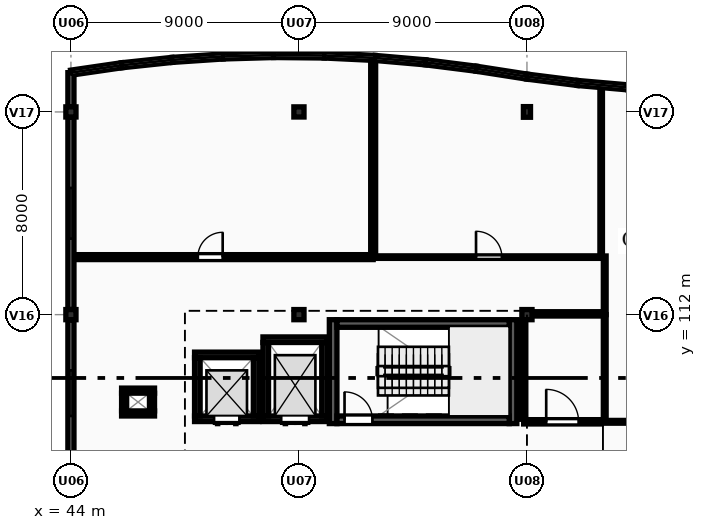
"""IFC4 building model, lengths in metres.
Left out: names, types, materials, properties, quantities, classifications, styles, units other than length and angle.
Written with IfcOpenShell. Run it as: python <this file> out.ifc"""

import sys

from ifc_helpers import new_model, si_unit, direction, frame, frame_2d, origin, origin_2d, place, context, subcontext, project, spatial, rectangle, extrude, element, fill, save


model = new_model("IFC4")
c1 = context("Model", 3, precision=1e-05, world=origin(), true_north=direction((0.0, 1.0)))
c2 = subcontext(c1, "Body", "Model", "MODEL_VIEW")
j1 = project(units=[si_unit("LENGTHUNIT", "METRE"), si_unit("PLANEANGLEUNIT", "RADIAN")], contexts=[c1])
p1 = place(None, origin())
s1 = spatial("IfcSite", under=j1, at=p1, CompositionType="ELEMENT")
p2 = place(p1, origin())
s2 = spatial("IfcBuilding", under=s1, at=p2, CompositionType="ELEMENT")
p3 = place(p2, frame((0.0, 0.0, 8.4)))
s3 = spatial("IfcBuildingStorey", under=s2, at=p3, CompositionType="ELEMENT", Elevation=8.4)
for number, where, z_axis, x_axis in (
    (1, (44.0, 112.0, 0.0), (0.0, 0.0, 1.0), (1.0, 0.0, 0.0)),
    (2, (44.0, 120.0, 0.0), (0.0, 0.0, 1.0), (1.0, 0.0, 0.0)),
    (3, (53.0, 112.0, 0.0), (0.0, 0.0, 1.0), (1.0, 0.0, 0.0)),
    (4, (53.0, 120.0, 0.0), (0.0, 0.0, 1.0), (1.0, 0.0, 0.0)),
    (5, (62.0, 112.0, 0.0), (0.0, 0.0, 1.0), (1.0, 0.0, 0.0)),
):
    element("IfcColumn", number, at=place(p3, frame(where, z_axis=z_axis, x_axis=x_axis)), inside=s3, PredefinedType="COLUMN", context=c2, shape_type="SweptSolid", body=[
        extrude(rectangle(XDim=0.4, YDim=0.4, at=origin_2d()), origin(), (0.0, 0.0, 1.0), 3.9),
    ])
p4 = place(p3, frame((62.0, 120.0, 0.0), z_axis=(0.0, 0.0, 1.0), x_axis=(1.0, 0.0, 0.0)))
e6 = element("IfcColumn", 6, at=p4, inside=s3, PredefinedType="PILASTER", context=c2, shape_type="SweptSolid", body=[
    extrude(rectangle(XDim=0.28, YDim=0.42, at=origin_2d()), origin(), (0.0, 0.0, 1.0), 3.9),
])
p5 = place(p3, frame((44.0, 121.55, 0.0), z_axis=(0.0, 0.0, 1.0), x_axis=(0.989544477223, 0.144228040259, 0.0)))
e7 = element("IfcWall", 7, at=p5, inside=s3, PredefinedType="SOLIDWALL", context=c2, shape_type="SweptSolid", body=[
    extrude(rectangle(XDim=2.021, YDim=0.2, at=frame_2d((1.011, 0.0))), origin(), (0.0, 0.0, 1.0), 0.95),
])
p6 = place(p3, frame((46.0, 121.842, 0.0), z_axis=(0.0, 0.0, 1.0), x_axis=(0.994395160059, 0.105727317433, 0.0)))
e8 = element("IfcWall", 8, at=p6, inside=s3, PredefinedType="SOLIDWALL", context=c2, shape_type="SweptSolid", body=[
    extrude(rectangle(XDim=2.011, YDim=0.2, at=frame_2d((1.006, 0.0))), origin(), (0.0, 0.0, 1.0), 0.95),
])
p7 = place(p3, frame((48.0, 122.054, 0.0), z_axis=(0.0, 0.0, 1.0), x_axis=(0.997729302978, 0.067351599676, 0.0)))
e9 = element("IfcWall", 9, at=p7, inside=s3, PredefinedType="SOLIDWALL", context=c2, shape_type="SweptSolid", body=[
    extrude(rectangle(XDim=2.005, YDim=0.2, at=frame_2d((1.002, 0.0))), origin(), (0.0, 0.0, 1.0), 0.95),
])
p8 = place(p3, frame((50.0, 122.189, 0.0), z_axis=(0.0, 0.0, 1.0), x_axis=(0.999581770858, 0.028918564416, 0.0)))
e10 = element("IfcWall", 10, at=p8, inside=s3, PredefinedType="SOLIDWALL", context=c2, shape_type="SweptSolid", body=[
    extrude(rectangle(XDim=2.001, YDim=0.2, at=frame_2d((1.0, 0.0))), origin(), (0.0, 0.0, 1.0), 0.95),
])
p9 = place(p3, frame((52.0, 122.247, 0.0), z_axis=(0.0, 0.0, 1.0), x_axis=(0.999953504169, -0.009643106302, 0.0)))
e11 = element("IfcWall", 11, at=p9, inside=s3, PredefinedType="SOLIDWALL", context=c2, shape_type="SweptSolid", body=[
    extrude(rectangle(XDim=2.0, YDim=0.2, at=frame_2d((1.0, 0.0))), origin(), (0.0, 0.0, 1.0), 0.95),
])
p10 = place(p3, frame((54.0, 122.228, 0.0), z_axis=(0.0, 0.0, 1.0), x_axis=(0.99884540439, -0.048040172037, 0.0)))
e12 = element("IfcWall", 12, at=p10, inside=s3, PredefinedType="SOLIDWALL", context=c2, shape_type="SweptSolid", body=[
    extrude(rectangle(XDim=2.002, YDim=0.2, at=frame_2d((1.001, 0.0))), origin(), (0.0, 0.0, 1.0), 0.95),
])
p11 = place(p3, frame((56.0, 122.132, 0.0), z_axis=(0.0, 0.0, 1.0), x_axis=(0.996244237948, -0.086587633962, 0.0)))
e13 = element("IfcWall", 13, at=p11, inside=s3, PredefinedType="SOLIDWALL", context=c2, shape_type="SweptSolid", body=[
    extrude(rectangle(XDim=2.008, YDim=0.2, at=frame_2d((1.004, 0.0))), origin(), (0.0, 0.0, 1.0), 0.95),
])
p12 = place(p3, frame((58.0, 121.958, 0.0), z_axis=(0.0, 0.0, 1.0), x_axis=(0.992158168336, -0.124988675503, 0.0)))
e14 = element("IfcWall", 14, at=p12, inside=s3, PredefinedType="SOLIDWALL", context=c2, shape_type="SweptSolid", body=[
    extrude(rectangle(XDim=2.016, YDim=0.2, at=frame_2d((1.008, 0.0))), origin(), (0.0, 0.0, 1.0), 0.95),
])
p13 = place(p3, frame((60.0, 121.706, 0.0), z_axis=(0.0, 0.0, 1.0), x_axis=(0.988085509852, -0.153905897287, 0.0)))
e15 = element("IfcWall", 15, at=p13, inside=s3, PredefinedType="SOLIDWALL", context=c2, shape_type="SweptSolid", body=[
    extrude(rectangle(XDim=2.024, YDim=0.2, at=frame_2d((1.012, 0.0))), origin(), (0.0, 0.0, 1.0), 0.95),
])
p14 = place(p3, frame((62.0, 121.394, 0.0), z_axis=(0.0, 0.0, 1.0), x_axis=(0.992158168336, -0.124988675503, 0.0)))
e16 = element("IfcWall", 16, at=p14, inside=s3, PredefinedType="SOLIDWALL", context=c2, shape_type="SweptSolid", body=[
    extrude(rectangle(XDim=2.016, YDim=0.2, at=frame_2d((1.008, 0.0))), origin(), (0.0, 0.0, 1.0), 0.95),
])
p15 = place(p3, frame((64.0, 121.142, 0.0), z_axis=(0.0, 0.0, 1.0), x_axis=(0.996244237948, -0.086587633962, 0.0)))
e17 = element("IfcWall", 17, at=p15, inside=s3, PredefinedType="SOLIDWALL", context=c2, shape_type="SweptSolid", body=[
    extrude(rectangle(XDim=2.008, YDim=0.2, at=frame_2d((1.004, 0.0))), origin(), (0.0, 0.0, 1.0), 0.95),
])
p16 = place(p3, frame((44.0, 104.2, 0.0), z_axis=(0.0, 0.0, 1.0), x_axis=(0.0, 1.0, 0.0)))
e18 = element("IfcWall", 18, at=p16, inside=s3, PredefinedType="SOLIDWALL", context=c2, shape_type="SweptSolid", body=[
    extrude(rectangle(XDim=7.6, YDim=0.24, at=frame_2d((3.8, 0.0))), origin(), (0.0, 0.0, 1.0), 3.29),
])
p17 = place(p16, frame((3.8, 0.0, 0.95)))
e19 = element("IfcOpeningElement", 19, at=p17, cuts=e18, PredefinedType="OPENING", context=c2, shape_type="SweptSolid", body=[
    extrude(rectangle(XDim=1.8, YDim=1.5, at=frame_2d((0.9, 0.75))), frame((0.0, 0.13, 0.0), z_axis=(0.0, -1.0, 0.0), x_axis=(1.0, 0.0, 0.0)), (0.0, 0.0, 1.0), 0.26),
])
p18 = place(p3, frame((44.0, 112.2, 0.0), z_axis=(0.0, 0.0, 1.0), x_axis=(0.0, 1.0, 0.0)))
e20 = element("IfcWall", 20, at=p18, inside=s3, PredefinedType="SOLIDWALL", context=c2, shape_type="SweptSolid", body=[
    extrude(rectangle(XDim=7.6, YDim=0.24, at=frame_2d((3.8, 0.0))), origin(), (0.0, 0.0, 1.0), 3.29),
])
p19 = place(p18, frame((2.8, 0.0, 0.95)))
e21 = element("IfcOpeningElement", 21, at=p19, cuts=e20, PredefinedType="OPENING", context=c2, shape_type="SweptSolid", body=[
    extrude(rectangle(XDim=2.0, YDim=1.5, at=frame_2d((1.0, 0.75))), frame((0.0, 0.13, 0.0), z_axis=(0.0, -1.0, 0.0), x_axis=(1.0, 0.0, 0.0)), (0.0, 0.0, 1.0), 0.26),
])
p20 = place(p3, frame((44.0, 120.2, 0.0), z_axis=(0.0, 0.0, 1.0), x_axis=(0.0, 1.0, 0.0)))
e22 = element("IfcWall", 22, at=p20, inside=s3, PredefinedType="SOLIDWALL", context=c2, shape_type="SweptSolid", body=[
    extrude(rectangle(XDim=1.35, YDim=0.24, at=frame_2d((0.675, 0.0))), origin(), (0.0, 0.0, 1.0), 3.29),
])
for number, where, z_axis, x_axis in (
    (23, (54.35, 107.7, 0.0), (0.0, 0.0, 1.0), (0.0, 1.0, 0.0)),
    (24, (61.45, 111.8, 0.0), (0.0, 0.0, 1.0), (0.0, -1.0, 0.0)),
):
    element("IfcWall", number, at=place(p3, frame(where, z_axis=z_axis, x_axis=x_axis)), inside=s3, PredefinedType="SHEAR", context=c2, shape_type="SweptSolid", body=[
        extrude(rectangle(XDim=4.1, YDim=0.3, at=frame_2d((2.05, 0.0))), origin(), (0.0, 0.0, 1.0), 3.65),
    ])
p21 = place(p3, frame((54.5, 107.85, 0.0), z_axis=(0.0, 0.0, 1.0), x_axis=(1.0, 0.0, 0.0)))
e25 = element("IfcWall", 25, at=p21, inside=s3, PredefinedType="SHEAR", context=c2, shape_type="SweptSolid", body=[
    extrude(rectangle(XDim=6.8, YDim=0.3, at=frame_2d((3.4, 0.0))), origin(), (0.0, 0.0, 1.0), 3.65),
])
p22 = place(p21, frame((0.3, 0.0, 0.0)))
e26 = element("IfcOpeningElement", 26, at=p22, cuts=e25, PredefinedType="OPENING", context=c2, shape_type="SweptSolid", body=[
    extrude(rectangle(XDim=1.1, YDim=2.15, at=frame_2d((0.55, 1.075))), frame((0.0, 0.16, 0.0), z_axis=(0.0, -1.0, 0.0), x_axis=(1.0, 0.0, 0.0)), (0.0, 0.0, 1.0), 0.32),
])
p23 = place(p3, frame((61.3, 111.65, 0.0), z_axis=(0.0, 0.0, 1.0), x_axis=(-1.0, 0.0, 0.0)))
e27 = element("IfcWall", 27, at=p23, inside=s3, PredefinedType="SHEAR", context=c2, shape_type="SweptSolid", body=[
    extrude(rectangle(XDim=6.8, YDim=0.3, at=frame_2d((3.4, 0.0))), origin(), (0.0, 0.0, 1.0), 3.65),
])
p24 = place(p3, frame((54.12, 107.89, 0.0), z_axis=(0.0, 0.0, 1.0), x_axis=(-1.0, 0.0, 0.0)))
e28 = element("IfcWall", 28, at=p24, inside=s3, PredefinedType="SHEAR", context=c2, shape_type="SweptSolid", body=[
    extrude(rectangle(XDim=2.54, YDim=0.22, at=frame_2d((1.27, 0.0))), origin(), (0.0, 0.0, 1.0), 3.65),
])
p25 = place(p24, frame((0.72, 0.0, 0.0)))
e29 = element("IfcOpeningElement", 29, at=p25, cuts=e28, PredefinedType="OPENING", context=c2, shape_type="SweptSolid", body=[
    extrude(rectangle(XDim=1.1, YDim=2.15, at=frame_2d((0.55, 1.075))), frame((0.0, 0.12, 0.0), z_axis=(0.0, -1.0, 0.0), x_axis=(1.0, 0.0, 0.0)), (0.0, 0.0, 1.0), 0.24),
])
p26 = place(p3, frame((51.58, 111.01, 0.0), z_axis=(0.0, 0.0, 1.0), x_axis=(1.0, 0.0, 0.0)))
e30 = element("IfcWall", 30, at=p26, inside=s3, PredefinedType="SHEAR", context=c2, shape_type="SweptSolid", body=[
    extrude(rectangle(XDim=2.54, YDim=0.22, at=frame_2d((1.27, 0.0))), origin(), (0.0, 0.0, 1.0), 3.65),
])
for number, where, z_axis, x_axis in (
    (31, (51.69, 108.0, 0.0), (0.0, 0.0, 1.0), (0.0, 1.0, 0.0)),
    (32, (54.01, 110.9, 0.0), (0.0, 0.0, 1.0), (0.0, -1.0, 0.0)),
):
    element("IfcWall", number, at=place(p3, frame(where, z_axis=z_axis, x_axis=x_axis)), inside=s3, PredefinedType="SHEAR", context=c2, shape_type="SweptSolid", body=[
        extrude(rectangle(XDim=2.9, YDim=0.22, at=frame_2d((1.45, 0.0))), origin(), (0.0, 0.0, 1.0), 3.65),
    ])
p27 = place(p3, frame((51.42, 107.89, 0.0), z_axis=(0.0, 0.0, 1.0), x_axis=(-1.0, 0.0, 0.0)))
e33 = element("IfcWall", 33, at=p27, inside=s3, PredefinedType="SHEAR", context=c2, shape_type="SweptSolid", body=[
    extrude(rectangle(XDim=2.54, YDim=0.22, at=frame_2d((1.27, 0.0))), origin(), (0.0, 0.0, 1.0), 3.65),
])
p28 = place(p27, frame((0.77, 0.0, 0.0)))
e34 = element("IfcOpeningElement", 34, at=p28, cuts=e33, PredefinedType="OPENING", context=c2, shape_type="SweptSolid", body=[
    extrude(rectangle(XDim=1.0, YDim=2.15, at=frame_2d((0.5, 1.075))), frame((0.0, 0.12, 0.0), z_axis=(0.0, -1.0, 0.0), x_axis=(1.0, 0.0, 0.0)), (0.0, 0.0, 1.0), 0.24),
])
p29 = place(p3, frame((48.88, 110.41, 0.0), z_axis=(0.0, 0.0, 1.0), x_axis=(1.0, 0.0, 0.0)))
e35 = element("IfcWall", 35, at=p29, inside=s3, PredefinedType="SHEAR", context=c2, shape_type="SweptSolid", body=[
    extrude(rectangle(XDim=2.54, YDim=0.22, at=frame_2d((1.27, 0.0))), origin(), (0.0, 0.0, 1.0), 3.65),
])
for number, where, z_axis, x_axis in (
    (36, (48.99, 108.0, 0.0), (0.0, 0.0, 1.0), (0.0, 1.0, 0.0)),
    (37, (51.31, 110.3, 0.0), (0.0, 0.0, 1.0), (0.0, -1.0, 0.0)),
):
    element("IfcWall", number, at=place(p3, frame(where, z_axis=z_axis, x_axis=x_axis)), inside=s3, PredefinedType="SHEAR", context=c2, shape_type="SweptSolid", body=[
        extrude(rectangle(XDim=2.3, YDim=0.22, at=frame_2d((1.15, 0.0))), origin(), (0.0, 0.0, 1.0), 3.65),
    ])
for number, where, z_axis, x_axis in (
    (38, (47.3, 108.1, 0.0), (0.0, 0.0, 1.0), (-1.0, 0.0, 0.0)),
    (39, (46.0, 109.0, 0.0), (0.0, 0.0, 1.0), (1.0, 0.0, 0.0)),
):
    element("IfcWall", number, at=place(p3, frame(where, z_axis=z_axis, x_axis=x_axis)), inside=s3, PredefinedType="PARTITIONING", context=c2, shape_type="SweptSolid", body=[
        extrude(rectangle(XDim=1.3, YDim=0.2, at=frame_2d((0.65, 0.0))), origin(), (0.0, 0.0, 1.0), 3.65),
    ])
p30 = place(p3, frame((46.1, 108.2, 0.0), z_axis=(0.0, 0.0, 1.0), x_axis=(0.0, 1.0, 0.0)))
e40 = element("IfcWall", 40, at=p30, inside=s3, PredefinedType="PARTITIONING", context=c2, shape_type="SweptSolid", body=[
    extrude(rectangle(XDim=0.7, YDim=0.2, at=frame_2d((0.35, 0.0))), origin(), (0.0, 0.0, 1.0), 3.65),
])
p31 = place(p3, frame((47.2, 108.9, 0.0), z_axis=(0.0, 0.0, 1.0), x_axis=(0.0, -1.0, 0.0)))
e41 = element("IfcWall", 41, at=p31, inside=s3, PredefinedType="PARTITIONING", context=c2, shape_type="SweptSolid", body=[
    extrude(rectangle(XDim=0.7, YDim=0.2, at=frame_2d((0.35, 0.0))), origin(), (0.0, 0.0, 1.0), 3.248),
])
p32 = place(p3, frame((44.162, 114.27, 0.0), z_axis=(0.0, 0.0, 1.0), x_axis=(1.0, 0.0, 0.0)))
e42 = element("IfcWall", 42, at=p32, inside=s3, PredefinedType="PARTITIONING", context=c2, shape_type="SweptSolid", body=[
    extrude(rectangle(XDim=11.768, YDim=0.195, at=frame_2d((5.884, 0.0))), origin(), (0.0, 0.0, 1.0), 3.65),
])
p33 = place(p32, frame((4.848, 0.0, 0.0)))
e43 = element("IfcOpeningElement", 43, at=p33, cuts=e42, PredefinedType="OPENING", context=c2, shape_type="SweptSolid", body=[
    extrude(rectangle(XDim=0.98, YDim=2.1, at=frame_2d((0.49, 1.05))), frame((0.0, 0.107, 0.0), z_axis=(0.0, -1.0, 0.0), x_axis=(1.0, 0.0, 0.0)), (0.0, 0.0, 1.0), 0.215),
])
p34 = place(p3, frame((55.93, 114.383, 0.0), z_axis=(0.0, 0.0, 1.0), x_axis=(0.0, 1.0, 0.0)))
e44 = element("IfcWall", 44, at=p34, inside=s3, PredefinedType="PARTITIONING", context=c2, shape_type="SweptSolid", body=[
    extrude(rectangle(XDim=7.61, YDim=0.195, at=frame_2d((3.805, 0.0))), origin(), (0.0, 0.0, 1.0), 3.65),
])
p35 = place(p3, frame((56.07, 114.27, 0.0), z_axis=(0.0, 0.0, 1.0), x_axis=(1.0, 0.0, 0.0)))
e45 = element("IfcWall", 45, at=p35, inside=s3, PredefinedType="PARTITIONING", context=c2, shape_type="SweptSolid", body=[
    extrude(rectangle(XDim=8.86, YDim=0.1, at=frame_2d((4.43, 0.0))), origin(), (0.0, 0.0, 1.0), 3.65),
])
p36 = place(p35, frame((3.92, 0.0, 0.0)))
e46 = element("IfcOpeningElement", 46, at=p36, cuts=e45, PredefinedType="OPENING", context=c2, shape_type="SweptSolid", body=[
    extrude(rectangle(XDim=1.02, YDim=2.1, at=frame_2d((0.51, 1.05))), frame((0.0, 0.06, 0.0), z_axis=(0.0, -1.0, 0.0), x_axis=(1.0, 0.0, 0.0)), (0.0, 0.0, 1.0), 0.12),
])
p37 = place(p3, frame((64.93, 114.335, 0.0), z_axis=(0.0, 0.0, 1.0), x_axis=(0.0, 1.0, 0.0)))
e47 = element("IfcWall", 47, at=p37, inside=s3, PredefinedType="PARTITIONING", context=c2, shape_type="SweptSolid", body=[
    extrude(rectangle(XDim=6.584, YDim=0.1, at=frame_2d((3.292, 0.0))), origin(), (0.0, 0.0, 1.0), 3.65),
])
p38 = place(p3, frame((65.07, 107.77, 0.0), z_axis=(0.0, 0.0, 1.0), x_axis=(1.0, 0.0, 0.0)))
e48 = element("IfcWall", 48, at=p38, inside=s3, PredefinedType="PARTITIONING", context=c2, shape_type="SweptSolid", body=[
    extrude(rectangle(XDim=10.36, YDim=0.11, at=frame_2d((5.18, 0.0))), origin(), (0.0, 0.0, 1.0), 3.65),
])
p39 = place(p38, frame((3.905, 0.0, 0.0)))
e49 = element("IfcOpeningElement", 49, at=p39, cuts=e48, PredefinedType="OPENING", context=c2, shape_type="SweptSolid", body=[
    extrude(rectangle(XDim=1.05, YDim=2.1, at=frame_2d((0.525, 1.05))), frame((0.0, 0.065, 0.0), z_axis=(0.0, -1.0, 0.0), x_axis=(1.0, 0.0, 0.0)), (0.0, 0.0, 1.0), 0.13),
])
p40 = place(p3, frame((65.07, 107.84, 0.0), z_axis=(0.0, 0.0, 1.0), x_axis=(0.0, 1.0, 0.0)))
e50 = element("IfcWall", 50, at=p40, inside=s3, PredefinedType="PARTITIONING", context=c2, shape_type="SweptSolid", body=[
    extrude(rectangle(XDim=4.16, YDim=0.11, at=frame_2d((2.08, 0.0))), origin(), (0.0, 0.0, 1.0), 3.65),
])
p41 = place(p3, frame((65.07, 112.0, 0.0), z_axis=(0.0, 0.0, 1.0), x_axis=(0.0, 1.0, 0.0)))
e51 = element("IfcWall", 51, at=p41, inside=s3, PredefinedType="PARTITIONING", context=c2, shape_type="SweptSolid", body=[
    extrude(rectangle(XDim=2.315, YDim=0.11, at=frame_2d((1.157, 0.0))), origin(), (0.0, 0.0, 1.0), 3.65),
])
p42 = place(p3, frame((61.87, 107.77, 0.0), z_axis=(0.0, 0.0, 1.0), x_axis=(1.0, 0.0, 0.0)))
e52 = element("IfcWall", 52, at=p42, inside=s3, PredefinedType="PARTITIONING", context=c2, shape_type="SweptSolid", body=[
    extrude(rectangle(XDim=3.06, YDim=0.17, at=frame_2d((1.53, 0.0))), origin(), (0.0, 0.0, 1.0), 3.65),
])
p43 = place(p42, frame((0.89, 0.0, 0.0)))
e53 = element("IfcOpeningElement", 53, at=p43, cuts=e52, PredefinedType="OPENING", context=c2, shape_type="SweptSolid", body=[
    extrude(rectangle(XDim=1.28, YDim=2.15, at=frame_2d((0.64, 1.075))), frame((0.0, 0.095, 0.0), z_axis=(0.0, -1.0, 0.0), x_axis=(1.0, 0.0, 0.0)), (0.0, 0.0, 1.0), 0.19),
])
p44 = place(p3, frame((62.215, 112.03, 0.0), z_axis=(0.0, 0.0, 1.0), x_axis=(1.0, 0.0, 0.0)))
e54 = element("IfcWall", 54, at=p44, inside=s3, PredefinedType="PARTITIONING", context=c2, shape_type="SweptSolid", body=[
    extrude(rectangle(XDim=2.715, YDim=0.17, at=frame_2d((1.357, 0.0))), origin(), (0.0, 0.0, 1.0), 3.65),
])
p45 = place(p3, frame((61.87, 107.87, 0.0), z_axis=(0.0, 0.0, 1.0), x_axis=(0.0, 1.0, 0.0)))
e55 = element("IfcWall", 55, at=p45, inside=s3, PredefinedType="PARTITIONING", context=c2, shape_type="SweptSolid", body=[
    extrude(rectangle(XDim=3.915, YDim=0.17, at=frame_2d((1.958, 0.0))), origin(), (0.0, 0.0, 1.0), 3.65),
])
p46 = place(p17, origin())
e56 = element("IfcWindow", 56, at=p46, inside=s3, PartitioningType="DOUBLE_PANEL_VERTICAL", PredefinedType="WINDOW", context=c2, shape_type="SweptSolid", body=[
    extrude(rectangle(XDim=1.8, YDim=1.5, at=frame_2d((0.9, 0.75))), frame((0.0, 0.03, 0.0), z_axis=(0.0, -1.0, 0.0), x_axis=(1.0, 0.0, 0.0)), (0.0, 0.0, 1.0), 0.06),
])
fill(e19, e56)
p47 = place(p19, origin())
e57 = element("IfcWindow", 57, at=p47, inside=s3, PartitioningType="DOUBLE_PANEL_VERTICAL", PredefinedType="WINDOW", context=c2, shape_type="SweptSolid", body=[
    extrude(rectangle(XDim=2.0, YDim=1.5, at=frame_2d((1.0, 0.75))), frame((0.0, 0.03, 0.0), z_axis=(0.0, -1.0, 0.0), x_axis=(1.0, 0.0, 0.0)), (0.0, 0.0, 1.0), 0.06),
])
fill(e21, e57)
p48 = place(p22, origin())
e58 = element("IfcDoor", 58, at=p48, inside=s3, OperationType="SINGLE_SWING_LEFT", PredefinedType="DOOR", context=c2, shape_type="SweptSolid", body=[
    extrude(rectangle(XDim=1.1, YDim=2.15, at=frame_2d((0.55, 1.075))), frame((0.0, 0.025, 0.0), z_axis=(0.0, -1.0, 0.0), x_axis=(1.0, 0.0, 0.0)), (0.0, 0.0, 1.0), 0.05),
])
fill(e26, e58)
p49 = place(p25, origin())
e59 = element("IfcDoor", 59, at=p49, inside=s3, OperationType="DOUBLE_DOOR_SLIDING", PredefinedType="DOOR", context=c2, shape_type="SweptSolid", body=[
    extrude(rectangle(XDim=1.1, YDim=2.15, at=frame_2d((0.55, 1.075))), frame((0.0, 0.025, 0.0), z_axis=(0.0, -1.0, 0.0), x_axis=(1.0, 0.0, 0.0)), (0.0, 0.0, 1.0), 0.05),
])
fill(e29, e59)
p50 = place(p28, origin())
e60 = element("IfcDoor", 60, at=p50, inside=s3, OperationType="DOUBLE_DOOR_SLIDING", PredefinedType="DOOR", context=c2, shape_type="SweptSolid", body=[
    extrude(rectangle(XDim=1.0, YDim=2.15, at=frame_2d((0.5, 1.075))), frame((0.0, 0.025, 0.0), z_axis=(0.0, -1.0, 0.0), x_axis=(1.0, 0.0, 0.0)), (0.0, 0.0, 1.0), 0.05),
])
fill(e34, e60)
p51 = place(p33, origin())
e61 = element("IfcDoor", 61, at=p51, inside=s3, OperationType="SINGLE_SWING_RIGHT", PredefinedType="DOOR", context=c2, shape_type="SweptSolid", body=[
    extrude(rectangle(XDim=0.98, YDim=2.1, at=frame_2d((0.49, 1.05))), frame((0.0, 0.025, 0.0), z_axis=(0.0, -1.0, 0.0), x_axis=(1.0, 0.0, 0.0)), (0.0, 0.0, 1.0), 0.05),
])
fill(e43, e61)
p52 = place(p36, origin())
e62 = element("IfcDoor", 62, at=p52, inside=s3, OperationType="SINGLE_SWING_LEFT", PredefinedType="DOOR", context=c2, shape_type="SweptSolid", body=[
    extrude(rectangle(XDim=1.02, YDim=2.1, at=frame_2d((0.51, 1.05))), frame((0.0, 0.025, 0.0), z_axis=(0.0, -1.0, 0.0), x_axis=(1.0, 0.0, 0.0)), (0.0, 0.0, 1.0), 0.05),
])
fill(e46, e62)
p53 = place(p43, origin())
e63 = element("IfcDoor", 63, at=p53, inside=s3, OperationType="SINGLE_SWING_LEFT", PredefinedType="DOOR", context=c2, shape_type="SweptSolid", body=[
    extrude(rectangle(XDim=1.28, YDim=2.15, at=frame_2d((0.64, 1.075))), frame((0.0, 0.025, 0.0), z_axis=(0.0, -1.0, 0.0), x_axis=(1.0, 0.0, 0.0)), (0.0, 0.0, 1.0), 0.05),
])
fill(e53, e63)
save(model, sys.argv[1])
